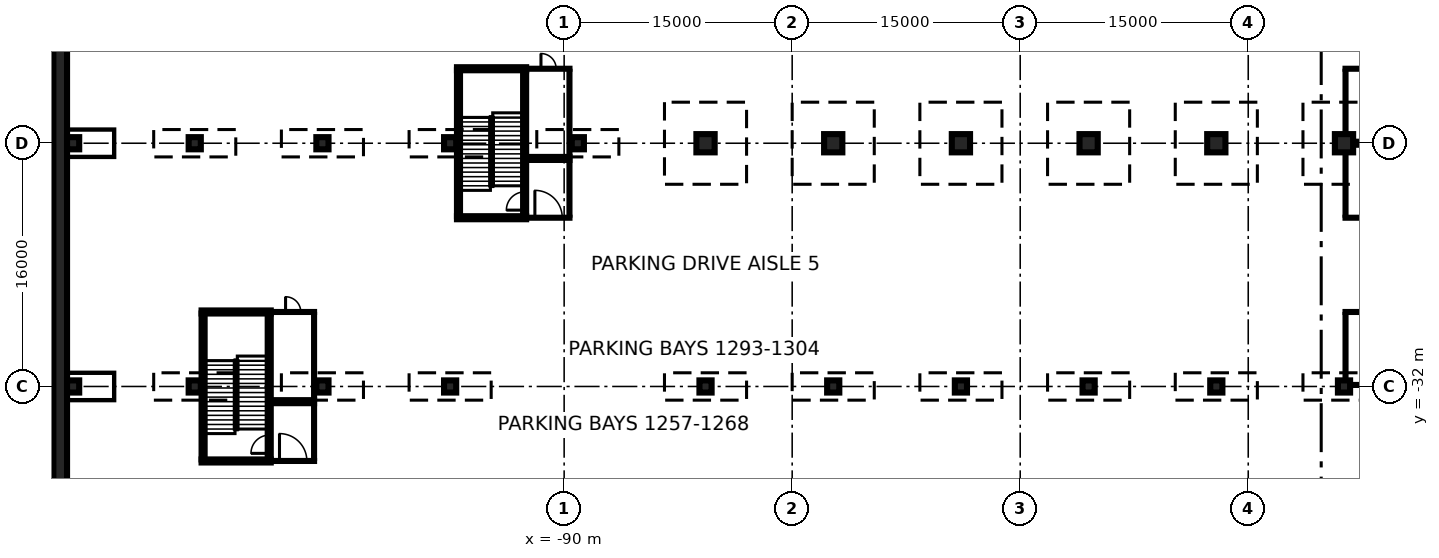
"""IFC4 building model, lengths in metres.
Left out: names, types, materials, properties, quantities, classifications, styles, units other than length and angle.
Written with IfcOpenShell. Run it as: python <this file> out.ifc"""

import sys

from ifc_helpers import new_model, si_unit, direction, frame, frame_2d, origin, origin_2d, place, context, subcontext, project, spatial, rectangle, extrude, element, fill, save


model = new_model("IFC4")
c1 = context("Model", 3, precision=1e-05, world=origin(), true_north=direction((0.0, 1.0)))
c2 = subcontext(c1, "Body", "Model", "MODEL_VIEW")
j1 = project(units=[si_unit("LENGTHUNIT", "METRE"), si_unit("PLANEANGLEUNIT", "RADIAN")], contexts=[c1])
p1 = place(None, origin())
s1 = spatial("IfcSite", under=j1, at=p1, CompositionType="ELEMENT")
p2 = place(p1, origin())
s2 = spatial("IfcBuilding", under=s1, at=p2, CompositionType="ELEMENT")
p3 = place(p2, frame((0.0, 0.0, -12.0)))
s3 = spatial("IfcBuildingStorey", under=s2, at=p3, CompositionType="ELEMENT", Elevation=-12.0)
p4 = place(p3, frame((-123.15, -80.0, 0.0), z_axis=(0.0, 0.0, 1.0), x_axis=(0.0, 1.0, 0.0)))
e1 = element("IfcWall", 1, at=p4, inside=s3, PredefinedType="USERDEFINED", context=c2, shape_type="SweptSolid", body=[
    extrude(rectangle(XDim=160.0, YDim=0.9, at=frame_2d((80.0, 0.0))), origin(), (0.0, 0.0, 1.0), 11.55),
])
for number, where, z_axis, x_axis in (
    (2, (-122.3, -32.0, 0.0), (0.0, 0.0, 1.0), (1.0, 0.0, 0.0)),
    (3, (-122.3, -16.0, 0.0), (0.0, 0.0, 1.0), (1.0, 0.0, 0.0)),
    (4, (-114.3, -32.0, 0.0), (0.0, 0.0, 1.0), (1.0, 0.0, 0.0)),
    (5, (-114.3, -16.0, 0.0), (0.0, 0.0, 1.0), (1.0, 0.0, 0.0)),
    (6, (-105.9, -32.0, 0.0), (0.0, 0.0, 1.0), (1.0, 0.0, 0.0)),
    (7, (-105.9, -16.0, 0.0), (0.0, 0.0, 1.0), (1.0, 0.0, 0.0)),
    (8, (-97.5, -32.0, 0.0), (0.0, 0.0, 1.0), (1.0, 0.0, 0.0)),
    (9, (-97.5, -16.0, 0.0), (0.0, 0.0, 1.0), (1.0, 0.0, 0.0)),
    (10, (-89.1, -16.0, 0.0), (0.0, 0.0, 1.0), (1.0, 0.0, 0.0)),
    (11, (-80.7, -32.0, 0.0), (0.0, 0.0, 1.0), (1.0, 0.0, 0.0)),
):
    element("IfcColumn", number, at=place(p3, frame(where, z_axis=z_axis, x_axis=x_axis)), inside=s3, PredefinedType="COLUMN", context=c2, shape_type="SweptSolid", body=[
        extrude(rectangle(XDim=0.8, YDim=0.8, at=origin_2d()), origin(), (0.0, 0.0, 1.0), 4.4),
    ])
p5 = place(p3, frame((-80.7, -16.0, 0.0), z_axis=(0.0, 0.0, 1.0), x_axis=(1.0, 0.0, 0.0)))
e12 = element("IfcColumn", 12, at=p5, inside=s3, PredefinedType="COLUMN", context=c2, shape_type="SweptSolid", body=[
    extrude(rectangle(XDim=1.2, YDim=1.2, at=origin_2d()), origin(), (0.0, 0.0, 1.0), 4.4),
])
p6 = place(p3, frame((-72.3, -32.0, 0.0), z_axis=(0.0, 0.0, 1.0), x_axis=(1.0, 0.0, 0.0)))
e13 = element("IfcColumn", 13, at=p6, inside=s3, PredefinedType="COLUMN", context=c2, shape_type="SweptSolid", body=[
    extrude(rectangle(XDim=0.8, YDim=0.8, at=origin_2d()), origin(), (0.0, 0.0, 1.0), 4.4),
])
p7 = place(p3, frame((-72.3, -16.0, 0.0), z_axis=(0.0, 0.0, 1.0), x_axis=(1.0, 0.0, 0.0)))
e14 = element("IfcColumn", 14, at=p7, inside=s3, PredefinedType="COLUMN", context=c2, shape_type="SweptSolid", body=[
    extrude(rectangle(XDim=1.2, YDim=1.2, at=origin_2d()), origin(), (0.0, 0.0, 1.0), 4.4),
])
p8 = place(p3, frame((-63.9, -32.0, 0.0), z_axis=(0.0, 0.0, 1.0), x_axis=(1.0, 0.0, 0.0)))
e15 = element("IfcColumn", 15, at=p8, inside=s3, PredefinedType="COLUMN", context=c2, shape_type="SweptSolid", body=[
    extrude(rectangle(XDim=0.8, YDim=0.8, at=origin_2d()), origin(), (0.0, 0.0, 1.0), 4.4),
])
p9 = place(p3, frame((-63.9, -16.0, 0.0), z_axis=(0.0, 0.0, 1.0), x_axis=(1.0, 0.0, 0.0)))
e16 = element("IfcColumn", 16, at=p9, inside=s3, PredefinedType="COLUMN", context=c2, shape_type="SweptSolid", body=[
    extrude(rectangle(XDim=1.2, YDim=1.2, at=origin_2d()), origin(), (0.0, 0.0, 1.0), 4.4),
])
p10 = place(p3, frame((-55.5, -32.0, 0.0), z_axis=(0.0, 0.0, 1.0), x_axis=(1.0, 0.0, 0.0)))
e17 = element("IfcColumn", 17, at=p10, inside=s3, PredefinedType="COLUMN", context=c2, shape_type="SweptSolid", body=[
    extrude(rectangle(XDim=0.8, YDim=0.8, at=origin_2d()), origin(), (0.0, 0.0, 1.0), 4.4),
])
p11 = place(p3, frame((-55.5, -16.0, 0.0), z_axis=(0.0, 0.0, 1.0), x_axis=(1.0, 0.0, 0.0)))
e18 = element("IfcColumn", 18, at=p11, inside=s3, PredefinedType="COLUMN", context=c2, shape_type="SweptSolid", body=[
    extrude(rectangle(XDim=1.2, YDim=1.2, at=origin_2d()), origin(), (0.0, 0.0, 1.0), 4.4),
])
p12 = place(p3, frame((-47.1, -32.0, 0.0), z_axis=(0.0, 0.0, 1.0), x_axis=(1.0, 0.0, 0.0)))
e19 = element("IfcColumn", 19, at=p12, inside=s3, PredefinedType="COLUMN", context=c2, shape_type="SweptSolid", body=[
    extrude(rectangle(XDim=0.8, YDim=0.8, at=origin_2d()), origin(), (0.0, 0.0, 1.0), 4.4),
])
p13 = place(p3, frame((-47.1, -16.0, 0.0), z_axis=(0.0, 0.0, 1.0), x_axis=(1.0, 0.0, 0.0)))
e20 = element("IfcColumn", 20, at=p13, inside=s3, PredefinedType="COLUMN", context=c2, shape_type="SweptSolid", body=[
    extrude(rectangle(XDim=1.2, YDim=1.2, at=origin_2d()), origin(), (0.0, 0.0, 1.0), 4.4),
])
p14 = place(p3, frame((-38.7, -32.0, 0.0), z_axis=(0.0, 0.0, 1.0), x_axis=(1.0, 0.0, 0.0)))
e21 = element("IfcColumn", 21, at=p14, inside=s3, PredefinedType="COLUMN", context=c2, shape_type="SweptSolid", body=[
    extrude(rectangle(XDim=0.8, YDim=0.8, at=origin_2d()), origin(), (0.0, 0.0, 1.0), 4.4),
])
p15 = place(p3, frame((-38.7, -16.0, 0.0), z_axis=(0.0, 0.0, 1.0), x_axis=(1.0, 0.0, 0.0)))
e22 = element("IfcColumn", 22, at=p15, inside=s3, PredefinedType="COLUMN", context=c2, shape_type="SweptSolid", body=[
    extrude(rectangle(XDim=1.2, YDim=1.2, at=origin_2d()), origin(), (0.0, 0.0, 1.0), 4.4),
])
p16 = place(p3, frame((-38.7, -31.9, 0.0), z_axis=(0.0, 0.0, 1.0), x_axis=(1.0, 0.0, 0.0)))
e23 = element("IfcWall", 23, at=p16, inside=s3, PredefinedType="PARTITIONING", context=c2, shape_type="SweptSolid", body=[
    extrude(rectangle(XDim=16.8, YDim=0.2, at=frame_2d((8.4, 0.0))), origin(), (0.0, 0.0, 1.0), 4.4),
])
p17 = place(p3, frame((-38.7, -27.1, 0.0), z_axis=(0.0, 0.0, 1.0), x_axis=(1.0, 0.0, 0.0)))
e24 = element("IfcWall", 24, at=p17, inside=s3, PredefinedType="PARTITIONING", context=c2, shape_type="SweptSolid", body=[
    extrude(rectangle(XDim=16.8, YDim=0.2, at=frame_2d((8.4, 0.0))), origin(), (0.0, 0.0, 1.0), 4.4),
])
p18 = place(p17, frame((3.3, 0.0, 0.0)))
e25 = element("IfcOpeningElement", 25, at=p18, cuts=e24, PredefinedType="OPENING", context=c2, shape_type="SweptSolid", body=[
    extrude(rectangle(XDim=1.8, YDim=2.1, at=frame_2d((0.9, 1.05))), frame((0.0, 0.11, 0.0), z_axis=(0.0, -1.0, 0.0), x_axis=(1.0, 0.0, 0.0)), (0.0, 0.0, 1.0), 0.22),
])
p19 = place(p3, frame((-38.6, -31.6, 0.0), z_axis=(0.0, 0.0, 1.0), x_axis=(0.0, 1.0, 0.0)))
e26 = element("IfcWall", 26, at=p19, inside=s3, PredefinedType="PARTITIONING", context=c2, shape_type="SweptSolid", body=[
    extrude(rectangle(XDim=4.4, YDim=0.2, at=frame_2d((2.2, 0.0))), origin(), (0.0, 0.0, 1.0), 4.4),
])
p20 = place(p3, frame((-38.7, -20.9, 0.0), z_axis=(0.0, 0.0, 1.0), x_axis=(1.0, 0.0, 0.0)))
e27 = element("IfcWall", 27, at=p20, inside=s3, PredefinedType="PARTITIONING", context=c2, shape_type="SweptSolid", body=[
    extrude(rectangle(XDim=16.8, YDim=0.2, at=frame_2d((8.4, 0.0))), origin(), (0.0, 0.0, 1.0), 4.4),
])
p21 = place(p20, frame((3.3, 0.0, 0.0)))
e28 = element("IfcOpeningElement", 28, at=p21, cuts=e27, PredefinedType="OPENING", context=c2, shape_type="SweptSolid", body=[
    extrude(rectangle(XDim=1.8, YDim=2.1, at=frame_2d((0.9, 1.05))), frame((0.0, 0.11, 0.0), z_axis=(0.0, -1.0, 0.0), x_axis=(1.0, 0.0, 0.0)), (0.0, 0.0, 1.0), 0.22),
])
p22 = place(p3, frame((-38.7, -16.1, 0.0), z_axis=(0.0, 0.0, 1.0), x_axis=(1.0, 0.0, 0.0)))
e29 = element("IfcWall", 29, at=p22, inside=s3, PredefinedType="PARTITIONING", context=c2, shape_type="SweptSolid", body=[
    extrude(rectangle(XDim=16.8, YDim=0.2, at=frame_2d((8.4, 0.0))), origin(), (0.0, 0.0, 1.0), 4.4),
])
p23 = place(p3, frame((-38.6, -20.8, 0.0), z_axis=(0.0, 0.0, 1.0), x_axis=(0.0, 1.0, 0.0)))
e30 = element("IfcWall", 30, at=p23, inside=s3, PredefinedType="PARTITIONING", context=c2, shape_type="SweptSolid", body=[
    extrude(rectangle(XDim=4.2, YDim=0.2, at=frame_2d((2.1, 0.0))), origin(), (0.0, 0.0, 1.0), 4.4),
])
p24 = place(p3, frame((-38.7, -15.9, 0.0), z_axis=(0.0, 0.0, 1.0), x_axis=(1.0, 0.0, 0.0)))
e31 = element("IfcWall", 31, at=p24, inside=s3, PredefinedType="PARTITIONING", context=c2, shape_type="SweptSolid", body=[
    extrude(rectangle(XDim=8.4, YDim=0.2, at=frame_2d((4.2, 0.0))), origin(), (0.0, 0.0, 1.0), 4.4),
])
p25 = place(p3, frame((-38.7, -11.1, 0.0), z_axis=(0.0, 0.0, 1.0), x_axis=(1.0, 0.0, 0.0)))
e32 = element("IfcWall", 32, at=p25, inside=s3, PredefinedType="PARTITIONING", context=c2, shape_type="SweptSolid", body=[
    extrude(rectangle(XDim=8.4, YDim=0.2, at=frame_2d((4.2, 0.0))), origin(), (0.0, 0.0, 1.0), 4.4),
])
p26 = place(p25, frame((3.3, 0.0, 0.0)))
e33 = element("IfcOpeningElement", 33, at=p26, cuts=e32, PredefinedType="OPENING", context=c2, shape_type="SweptSolid", body=[
    extrude(rectangle(XDim=1.8, YDim=2.1, at=frame_2d((0.9, 1.05))), frame((0.0, 0.11, 0.0), z_axis=(0.0, -1.0, 0.0), x_axis=(1.0, 0.0, 0.0)), (0.0, 0.0, 1.0), 0.22),
])
p27 = place(p3, frame((-38.6, -15.4, 0.0), z_axis=(0.0, 0.0, 1.0), x_axis=(0.0, 1.0, 0.0)))
e34 = element("IfcWall", 34, at=p27, inside=s3, PredefinedType="PARTITIONING", context=c2, shape_type="SweptSolid", body=[
    extrude(rectangle(XDim=4.2, YDim=0.2, at=frame_2d((2.1, 0.0))), origin(), (0.0, 0.0, 1.0), 4.4),
])
p28 = place(p3, frame((-109.3, -36.9, 0.0), z_axis=(0.0, 0.0, 1.0), x_axis=(1.0, 0.0, 0.0)))
e35 = element("IfcWall", 35, at=p28, inside=s3, PredefinedType="PARTITIONING", context=c2, shape_type="SweptSolid", body=[
    extrude(rectangle(XDim=2.95, YDim=0.2, at=frame_2d((1.475, 0.0))), origin(), (0.0, 0.0, 1.0), 4.4),
])
p29 = place(p28, frame((0.575, 0.0, 0.0)))
e36 = element("IfcOpeningElement", 36, at=p29, cuts=e35, PredefinedType="OPENING", context=c2, shape_type="SweptSolid", body=[
    extrude(rectangle(XDim=1.8, YDim=2.1, at=frame_2d((0.9, 1.05))), frame((0.0, 0.11, 0.0), z_axis=(0.0, -1.0, 0.0), x_axis=(1.0, 0.0, 0.0)), (0.0, 0.0, 1.0), 0.22),
])
p30 = place(p3, frame((-109.3, -33.1, 0.0), z_axis=(0.0, 0.0, 1.0), x_axis=(1.0, 0.0, 0.0)))
e37 = element("IfcWall", 37, at=p30, inside=s3, PredefinedType="PARTITIONING", context=c2, shape_type="SweptSolid", body=[
    extrude(rectangle(XDim=2.95, YDim=0.2, at=frame_2d((1.475, 0.0))), origin(), (0.0, 0.0, 1.0), 4.4),
])
p31 = place(p3, frame((-106.45, -36.8, 0.0), z_axis=(0.0, 0.0, 1.0), x_axis=(0.0, 1.0, 0.0)))
e38 = element("IfcWall", 38, at=p31, inside=s3, PredefinedType="PARTITIONING", context=c2, shape_type="SweptSolid", body=[
    extrude(rectangle(XDim=3.6, YDim=0.2, at=frame_2d((1.8, 0.0))), origin(), (0.0, 0.0, 1.0), 4.4),
])
p32 = place(p3, frame((-109.3, -32.9, 0.0), z_axis=(0.0, 0.0, 1.0), x_axis=(1.0, 0.0, 0.0)))
e39 = element("IfcWall", 39, at=p32, inside=s3, PredefinedType="PARTITIONING", context=c2, shape_type="SweptSolid", body=[
    extrude(rectangle(XDim=2.95, YDim=0.2, at=frame_2d((1.475, 0.0))), origin(), (0.0, 0.0, 1.0), 4.4),
])
p33 = place(p3, frame((-109.3, -27.1, 0.0), z_axis=(0.0, 0.0, 1.0), x_axis=(1.0, 0.0, 0.0)))
e40 = element("IfcWall", 40, at=p33, inside=s3, PredefinedType="PARTITIONING", context=c2, shape_type="SweptSolid", body=[
    extrude(rectangle(XDim=2.95, YDim=0.2, at=frame_2d((1.475, 0.0))), origin(), (0.0, 0.0, 1.0), 4.4),
])
p34 = place(p33, frame((0.975, 0.0, 0.0)))
e41 = element("IfcOpeningElement", 41, at=p34, cuts=e40, PredefinedType="OPENING", context=c2, shape_type="SweptSolid", body=[
    extrude(rectangle(XDim=1.0, YDim=2.1, at=frame_2d((0.5, 1.05))), frame((0.0, 0.11, 0.0), z_axis=(0.0, -1.0, 0.0), x_axis=(1.0, 0.0, 0.0)), (0.0, 0.0, 1.0), 0.22),
])
p35 = place(p3, frame((-106.45, -32.8, 0.0), z_axis=(0.0, 0.0, 1.0), x_axis=(0.0, 1.0, 0.0)))
e42 = element("IfcWall", 42, at=p35, inside=s3, PredefinedType="PARTITIONING", context=c2, shape_type="SweptSolid", body=[
    extrude(rectangle(XDim=5.6, YDim=0.2, at=frame_2d((2.8, 0.0))), origin(), (0.0, 0.0, 1.0), 4.4),
])
p36 = place(p3, frame((-92.5, -20.9, 0.0), z_axis=(0.0, 0.0, 1.0), x_axis=(1.0, 0.0, 0.0)))
e43 = element("IfcWall", 43, at=p36, inside=s3, PredefinedType="PARTITIONING", context=c2, shape_type="SweptSolid", body=[
    extrude(rectangle(XDim=2.95, YDim=0.2, at=frame_2d((1.475, 0.0))), origin(), (0.0, 0.0, 1.0), 4.4),
])
p37 = place(p36, frame((0.575, 0.0, 0.0)))
e44 = element("IfcOpeningElement", 44, at=p37, cuts=e43, PredefinedType="OPENING", context=c2, shape_type="SweptSolid", body=[
    extrude(rectangle(XDim=1.8, YDim=2.1, at=frame_2d((0.9, 1.05))), frame((0.0, 0.11, 0.0), z_axis=(0.0, -1.0, 0.0), x_axis=(1.0, 0.0, 0.0)), (0.0, 0.0, 1.0), 0.22),
])
p38 = place(p3, frame((-92.5, -17.1, 0.0), z_axis=(0.0, 0.0, 1.0), x_axis=(1.0, 0.0, 0.0)))
e45 = element("IfcWall", 45, at=p38, inside=s3, PredefinedType="PARTITIONING", context=c2, shape_type="SweptSolid", body=[
    extrude(rectangle(XDim=2.95, YDim=0.2, at=frame_2d((1.475, 0.0))), origin(), (0.0, 0.0, 1.0), 4.4),
])
p39 = place(p3, frame((-89.65, -20.8, 0.0), z_axis=(0.0, 0.0, 1.0), x_axis=(0.0, 1.0, 0.0)))
e46 = element("IfcWall", 46, at=p39, inside=s3, PredefinedType="PARTITIONING", context=c2, shape_type="SweptSolid", body=[
    extrude(rectangle(XDim=3.6, YDim=0.2, at=frame_2d((1.8, 0.0))), origin(), (0.0, 0.0, 1.0), 4.4),
])
p40 = place(p3, frame((-92.5, -16.9, 0.0), z_axis=(0.0, 0.0, 1.0), x_axis=(1.0, 0.0, 0.0)))
e47 = element("IfcWall", 47, at=p40, inside=s3, PredefinedType="PARTITIONING", context=c2, shape_type="SweptSolid", body=[
    extrude(rectangle(XDim=2.95, YDim=0.2, at=frame_2d((1.475, 0.0))), origin(), (0.0, 0.0, 1.0), 4.4),
])
p41 = place(p3, frame((-92.5, -11.1, 0.0), z_axis=(0.0, 0.0, 1.0), x_axis=(1.0, 0.0, 0.0)))
e48 = element("IfcWall", 48, at=p41, inside=s3, PredefinedType="PARTITIONING", context=c2, shape_type="SweptSolid", body=[
    extrude(rectangle(XDim=2.95, YDim=0.2, at=frame_2d((1.475, 0.0))), origin(), (0.0, 0.0, 1.0), 4.4),
])
p42 = place(p41, frame((0.975, 0.0, 0.0)))
e49 = element("IfcOpeningElement", 49, at=p42, cuts=e48, PredefinedType="OPENING", context=c2, shape_type="SweptSolid", body=[
    extrude(rectangle(XDim=1.0, YDim=2.1, at=frame_2d((0.5, 1.05))), frame((0.0, 0.11, 0.0), z_axis=(0.0, -1.0, 0.0), x_axis=(1.0, 0.0, 0.0)), (0.0, 0.0, 1.0), 0.22),
])
p43 = place(p3, frame((-89.65, -16.8, 0.0), z_axis=(0.0, 0.0, 1.0), x_axis=(0.0, 1.0, 0.0)))
e50 = element("IfcWall", 50, at=p43, inside=s3, PredefinedType="PARTITIONING", context=c2, shape_type="SweptSolid", body=[
    extrude(rectangle(XDim=5.6, YDim=0.2, at=frame_2d((2.8, 0.0))), origin(), (0.0, 0.0, 1.0), 4.4),
])
p44 = place(p3, frame((-113.75, -36.8, 0.0), z_axis=(0.0, 0.0, 1.0), x_axis=(0.0, 1.0, 0.0)))
e51 = element("IfcWall", 51, at=p44, inside=s3, PredefinedType="SOLIDWALL", context=c2, shape_type="SweptSolid", body=[
    extrude(rectangle(XDim=9.6, YDim=0.2, at=frame_2d((4.8, 0.0))), origin(), (0.0, 0.0, 1.0), 4.4),
])
p45 = place(p3, frame((-109.4, -36.8, 0.0), z_axis=(0.0, 0.0, 1.0), x_axis=(0.0, 1.0, 0.0)))
e52 = element("IfcWall", 52, at=p45, inside=s3, PredefinedType="SOLIDWALL", context=c2, shape_type="SweptSolid", body=[
    extrude(rectangle(XDim=9.6, YDim=0.2, at=frame_2d((4.8, 0.0))), origin(), (0.0, 0.0, 1.0), 4.4),
])
p46 = place(p45, frame((0.4, 0.0, 0.0)))
e53 = element("IfcOpeningElement", 53, at=p46, cuts=e52, PredefinedType="OPENING", context=c2, shape_type="SweptSolid", body=[
    extrude(rectangle(XDim=1.2, YDim=2.1, at=frame_2d((0.6, 1.05))), frame((0.0, 0.11, 0.0), z_axis=(0.0, -1.0, 0.0), x_axis=(1.0, 0.0, 0.0)), (0.0, 0.0, 1.0), 0.22),
])
for number, where, z_axis, x_axis in (
    (54, (-109.3, -36.9, 0.0), (0.0, 0.0, 1.0), (-1.0, 0.0, 0.0)),
    (55, (-113.85, -27.1, 0.0), (0.0, 0.0, 1.0), (1.0, 0.0, 0.0)),
):
    element("IfcWall", number, at=place(p3, frame(where, z_axis=z_axis, x_axis=x_axis)), inside=s3, PredefinedType="SOLIDWALL", context=c2, shape_type="SweptSolid", body=[
        extrude(rectangle(XDim=4.55, YDim=0.2, at=frame_2d((2.275, 0.0))), origin(), (0.0, 0.0, 1.0), 4.4),
    ])
p47 = place(p3, frame((-96.95, -20.8, 0.0), z_axis=(0.0, 0.0, 1.0), x_axis=(0.0, 1.0, 0.0)))
e56 = element("IfcWall", 56, at=p47, inside=s3, PredefinedType="SOLIDWALL", context=c2, shape_type="SweptSolid", body=[
    extrude(rectangle(XDim=9.6, YDim=0.2, at=frame_2d((4.8, 0.0))), origin(), (0.0, 0.0, 1.0), 4.4),
])
p48 = place(p3, frame((-92.6, -20.8, 0.0), z_axis=(0.0, 0.0, 1.0), x_axis=(0.0, 1.0, 0.0)))
e57 = element("IfcWall", 57, at=p48, inside=s3, PredefinedType="SOLIDWALL", context=c2, shape_type="SweptSolid", body=[
    extrude(rectangle(XDim=9.6, YDim=0.2, at=frame_2d((4.8, 0.0))), origin(), (0.0, 0.0, 1.0), 4.4),
])
p49 = place(p48, frame((0.4, 0.0, 0.0)))
e58 = element("IfcOpeningElement", 58, at=p49, cuts=e57, PredefinedType="OPENING", context=c2, shape_type="SweptSolid", body=[
    extrude(rectangle(XDim=1.2, YDim=2.1, at=frame_2d((0.6, 1.05))), frame((0.0, 0.11, 0.0), z_axis=(0.0, -1.0, 0.0), x_axis=(1.0, 0.0, 0.0)), (0.0, 0.0, 1.0), 0.22),
])
for number, where, z_axis, x_axis in (
    (59, (-92.5, -20.9, 0.0), (0.0, 0.0, 1.0), (-1.0, 0.0, 0.0)),
    (60, (-97.05, -11.1, 0.0), (0.0, 0.0, 1.0), (1.0, 0.0, 0.0)),
):
    element("IfcWall", number, at=place(p3, frame(where, z_axis=z_axis, x_axis=x_axis)), inside=s3, PredefinedType="SOLIDWALL", context=c2, shape_type="SweptSolid", body=[
        extrude(rectangle(XDim=4.55, YDim=0.2, at=frame_2d((2.275, 0.0))), origin(), (0.0, 0.0, 1.0), 4.4),
    ])
p50 = place(p29, origin())
e61 = element("IfcDoor", 61, at=p50, inside=s3, OperationType="DOUBLE_DOOR_SINGLE_SWING", PredefinedType="DOOR", context=c2, shape_type="SweptSolid", body=[
    extrude(rectangle(XDim=1.8, YDim=2.1, at=frame_2d((0.9, 1.05))), frame((0.0, 0.025, 0.0), z_axis=(0.0, -1.0, 0.0), x_axis=(1.0, 0.0, 0.0)), (0.0, 0.0, 1.0), 0.05),
])
fill(e36, e61)
p51 = place(p34, origin())
e62 = element("IfcDoor", 62, at=p51, inside=s3, OperationType="SINGLE_SWING_LEFT", PredefinedType="DOOR", context=c2, shape_type="SweptSolid", body=[
    extrude(rectangle(XDim=1.0, YDim=2.1, at=frame_2d((0.5, 1.05))), frame((0.0, 0.025, 0.0), z_axis=(0.0, -1.0, 0.0), x_axis=(1.0, 0.0, 0.0)), (0.0, 0.0, 1.0), 0.05),
])
fill(e41, e62)
p52 = place(p37, origin())
e63 = element("IfcDoor", 63, at=p52, inside=s3, OperationType="DOUBLE_DOOR_SINGLE_SWING", PredefinedType="DOOR", context=c2, shape_type="SweptSolid", body=[
    extrude(rectangle(XDim=1.8, YDim=2.1, at=frame_2d((0.9, 1.05))), frame((0.0, 0.025, 0.0), z_axis=(0.0, -1.0, 0.0), x_axis=(1.0, 0.0, 0.0)), (0.0, 0.0, 1.0), 0.05),
])
fill(e44, e63)
p53 = place(p42, origin())
e64 = element("IfcDoor", 64, at=p53, inside=s3, OperationType="SINGLE_SWING_LEFT", PredefinedType="DOOR", context=c2, shape_type="SweptSolid", body=[
    extrude(rectangle(XDim=1.0, YDim=2.1, at=frame_2d((0.5, 1.05))), frame((0.0, 0.025, 0.0), z_axis=(0.0, -1.0, 0.0), x_axis=(1.0, 0.0, 0.0)), (0.0, 0.0, 1.0), 0.05),
])
fill(e49, e64)
p54 = place(p46, origin())
e65 = element("IfcDoor", 65, at=p54, inside=s3, OperationType="SINGLE_SWING_LEFT", PredefinedType="DOOR", context=c2, shape_type="SweptSolid", body=[
    extrude(rectangle(XDim=1.2, YDim=2.1, at=frame_2d((0.6, 1.05))), frame((0.0, 0.025, 0.0), z_axis=(0.0, -1.0, 0.0), x_axis=(1.0, 0.0, 0.0)), (0.0, 0.0, 1.0), 0.05),
])
fill(e53, e65)
p55 = place(p49, origin())
e66 = element("IfcDoor", 66, at=p55, inside=s3, OperationType="SINGLE_SWING_LEFT", PredefinedType="DOOR", context=c2, shape_type="SweptSolid", body=[
    extrude(rectangle(XDim=1.2, YDim=2.1, at=frame_2d((0.6, 1.05))), frame((0.0, 0.025, 0.0), z_axis=(0.0, -1.0, 0.0), x_axis=(1.0, 0.0, 0.0)), (0.0, 0.0, 1.0), 0.05),
])
fill(e58, e66)
save(model, sys.argv[1])
